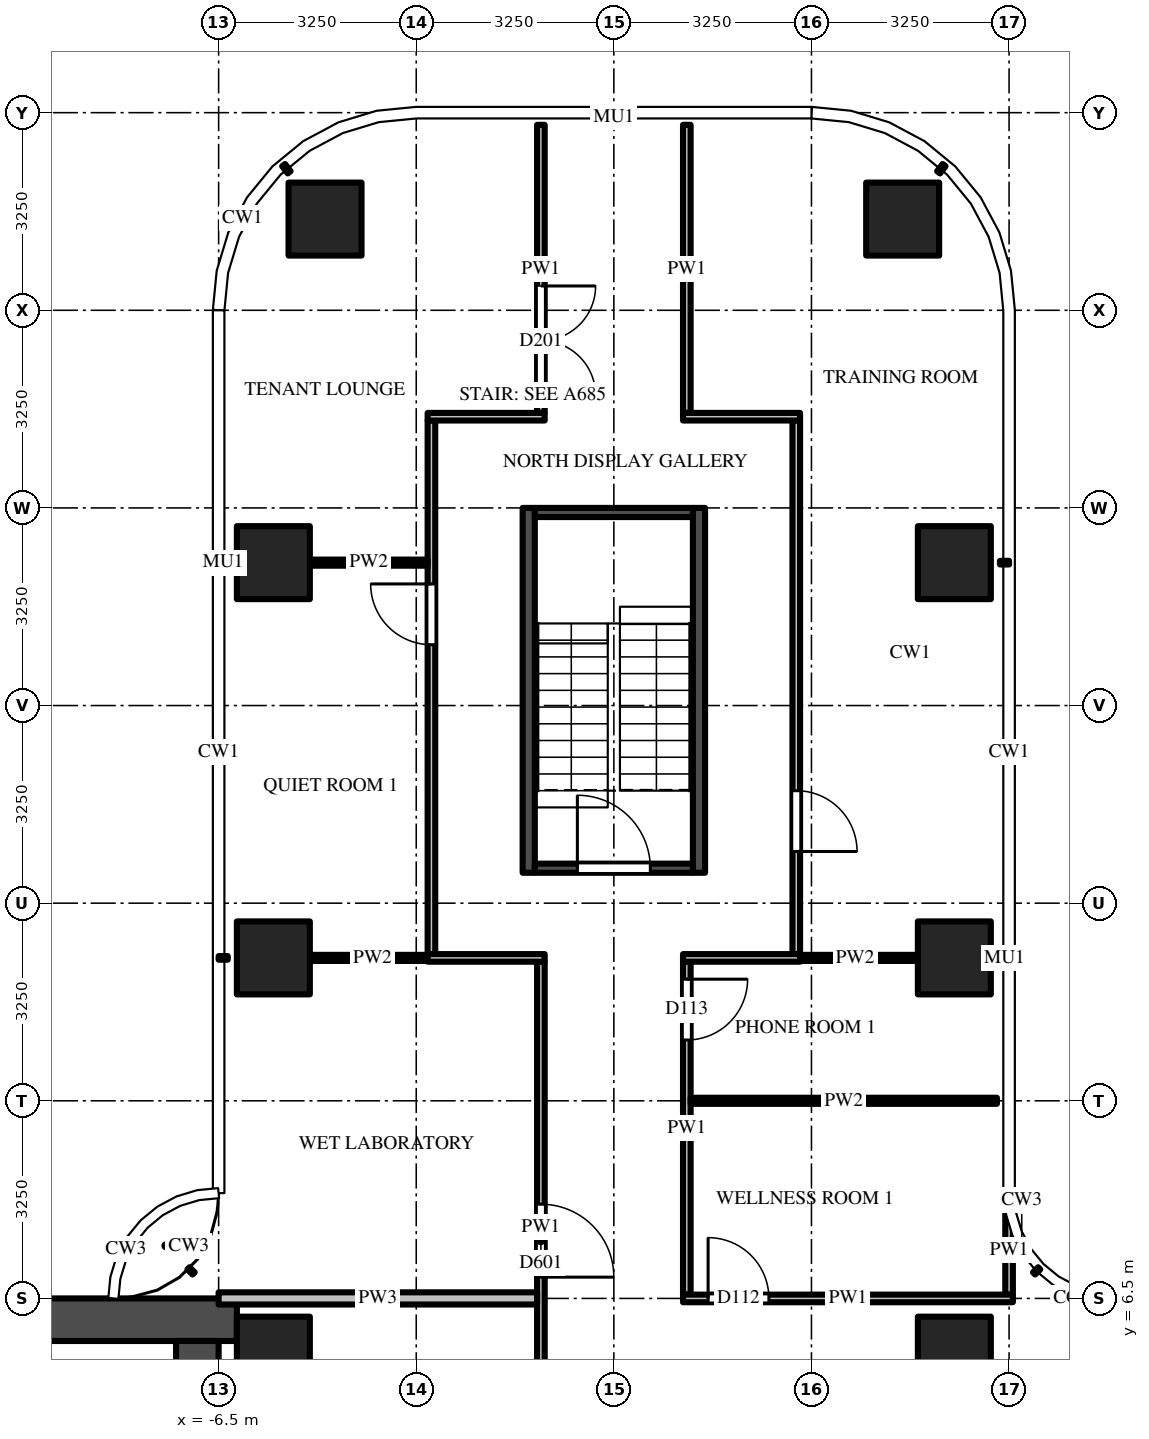
"""IFC4 building model, lengths in metres.
Left out: names, types, materials, properties, quantities, classifications, styles, units other than length and angle.
Written with IfcOpenShell. Run it as: python <this file> out.ifc"""

import sys

from ifc_helpers import new_model, si_unit, direction, frame, frame_2d, origin, origin_2d, place, context, subcontext, project, spatial, rectangle, extrude, source, transform, mapped, element, fill, save


model = new_model("IFC4")
c1 = context("Model", 3, precision=1e-05, world=origin(), true_north=direction((0.0, 1.0)))
c2 = subcontext(c1, "Body", "Model", "MODEL_VIEW")
j1 = project(units=[si_unit("LENGTHUNIT", "METRE"), si_unit("PLANEANGLEUNIT", "RADIAN")], contexts=[c1])
p1 = place(None, origin())
s1 = spatial("IfcSite", under=j1, at=p1, CompositionType="ELEMENT")
p2 = place(p1, origin())
s2 = spatial("IfcBuilding", under=s1, at=p2, CompositionType="ELEMENT")
p3 = place(p2, frame((0.0, 0.0, 181.5)))
s3 = spatial("IfcBuildingStorey", under=s2, at=p3, CompositionType="ELEMENT", Elevation=181.5)
m1 = source(origin(), c2, "Body", "SweptSolid", [
    extrude(rectangle(XDim=1.2, YDim=1.2, at=origin_2d()), origin(), (0.0, 0.0, 1.0), 3.9),
])
for number, where, z_axis, x_axis in (
    (1, (-5.6, 12.1, 0.0), (0.0, 0.0, 1.0), (1.0, 0.0, 0.0)),
    (2, (-5.6, 18.6, 0.0), (0.0, 0.0, 1.0), (1.0, 0.0, 0.0)),
    (3, (-4.75, 24.25, 0.0), (0.0, 0.0, 1.0), (1.0, 0.0, 0.0)),
    (4, (5.6, 12.1, 0.0), (0.0, 0.0, 1.0), (1.0, 0.0, 0.0)),
    (5, (5.6, 18.6, 0.0), (0.0, 0.0, 1.0), (1.0, 0.0, 0.0)),
    (6, (4.75, 24.25, 0.0), (0.0, 0.0, 1.0), (1.0, 0.0, 0.0)),
    (7, (5.6, 5.6, 0.0), (0.0, 0.0, 1.0), (1.0, 0.0, 0.0)),
    (8, (-5.6, 5.6, 0.0), (0.0, 0.0, 1.0), (1.0, 0.0, 0.0)),
):
    element("IfcColumn", number, at=place(p3, frame(where, z_axis=z_axis, x_axis=x_axis)), inside=s3, PredefinedType="COLUMN", context=c2, shape_type="MappedRepresentation", body=[
        mapped(m1, transform((0.0, 0.0, 0.0))),
    ])
m2 = source(origin(), c2, "Body", "SweptSolid", [
    extrude(rectangle(XDim=16.55, YDim=0.7, at=frame_2d((8.275, 0.0))), origin(), (0.0, 0.0, 1.0), 3.7),
])
p4 = place(p3, frame((-6.2, 6.15, 0.0), z_axis=(0.0, 0.0, 1.0), x_axis=(-1.0, 0.0, 0.0)))
e9 = element("IfcWall", 9, at=p4, inside=s3, PredefinedType="SHEAR", context=c2, shape_type="MappedRepresentation", body=[
    mapped(m2, transform((0.0, 0.0, 0.0))),
])
m3 = source(origin(), c2, "Body", "SweptSolid", [
    extrude(rectangle(XDim=9.05, YDim=0.7, at=frame_2d((4.525, 0.0))), origin(), (0.0, 0.0, 1.0), 3.7),
])
p5 = place(p3, frame((-6.85, 5.8, 0.0), z_axis=(0.0, 0.0, 1.0), x_axis=(0.0, -1.0, 0.0)))
e10 = element("IfcWall", 10, at=p5, inside=s3, PredefinedType="SHEAR", context=c2, shape_type="MappedRepresentation", body=[
    mapped(m3, transform((0.0, 0.0, 0.0))),
])
m4 = source(origin(), c2, "Body", "SweptSolid", [
    extrude(rectangle(XDim=1.8, YDim=2.1, at=frame_2d((0.9, 1.05))), frame((0.0, 0.36, 0.0), z_axis=(0.0, -1.0, 0.0), x_axis=(1.0, 0.0, 0.0)), (0.0, 0.0, 1.0), 0.72),
])
p6 = place(p5, frame((3.15, 0.0, 0.0)))
e11 = element("IfcOpeningElement", 11, at=p6, cuts=e10, PredefinedType="OPENING", context=c2, shape_type="MappedRepresentation", body=[
    mapped(m4, transform((0.0, 0.0, 0.0))),
])
m5 = source(origin(), c2, "Body", "SweptSolid", [
    extrude(rectangle(XDim=6.0, YDim=0.2, at=frame_2d((3.0, 0.0))), origin(), (0.0, 0.0, 1.0), 3.7),
])
for number, where, z_axis, x_axis in (
    (12, (-1.4, 13.5, 0.0), (0.0, 0.0, 1.0), (0.0, 1.0, 0.0)),
    (13, (1.4, 13.5, 0.0), (0.0, 0.0, 1.0), (0.0, 1.0, 0.0)),
):
    element("IfcWall", number, at=place(p3, frame(where, z_axis=z_axis, x_axis=x_axis)), inside=s3, PredefinedType="SHEAR", context=c2, shape_type="MappedRepresentation", body=[
        mapped(m5, transform((0.0, 0.0, 0.0))),
    ])
m6 = source(origin(), c2, "Body", "SweptSolid", [
    extrude(rectangle(XDim=2.6, YDim=0.15, at=frame_2d((1.3, 0.0))), origin(), (0.0, 0.0, 1.0), 3.7),
])
p7 = place(p3, frame((-1.3, 13.575, 0.0), z_axis=(0.0, 0.0, 1.0), x_axis=(1.0, 0.0, 0.0)))
e14 = element("IfcWall", 14, at=p7, inside=s3, PredefinedType="SHEAR", context=c2, shape_type="MappedRepresentation", body=[
    mapped(m6, transform((0.0, 0.0, 0.0))),
])
m7 = source(origin(), c2, "Body", "SweptSolid", [
    extrude(rectangle(XDim=1.2, YDim=2.1, at=frame_2d((0.6, 1.05))), frame((0.0, 0.085, 0.0), z_axis=(0.0, -1.0, 0.0), x_axis=(1.0, 0.0, 0.0)), (0.0, 0.0, 1.0), 0.17),
])
p8 = place(p7, frame((0.7, 0.0, 0.0)))
e15 = element("IfcOpeningElement", 15, at=p8, cuts=e14, PredefinedType="OPENING", context=c2, shape_type="MappedRepresentation", body=[
    mapped(m7, transform((0.0, 0.0, 0.0))),
])
p9 = place(p3, frame((-1.3, 19.425, 0.0), z_axis=(0.0, 0.0, 1.0), x_axis=(1.0, 0.0, 0.0)))
e16 = element("IfcWall", 16, at=p9, inside=s3, PredefinedType="SHEAR", context=c2, shape_type="MappedRepresentation", body=[
    mapped(m6, transform((0.0, 0.0, 0.0))),
])
m8 = source(origin(), c2, "Body", "SweptSolid", [
    extrude(rectangle(XDim=8.788, YDim=0.125, at=frame_2d((4.394, 0.0))), origin(), (0.0, 0.0, 1.0), 2.997),
])
p10 = place(p3, frame((-3.0, 12.15, 0.0), z_axis=(0.0, 0.0, 1.0), x_axis=(0.0, 1.0, 0.0)))
e17 = element("IfcWall", 17, at=p10, inside=s3, PredefinedType="PARTITIONING", context=c2, shape_type="MappedRepresentation", body=[
    mapped(m8, transform((0.0, 0.0, 0.0))),
])
m9 = source(origin(), c2, "Body", "SweptSolid", [
    extrude(rectangle(XDim=1.0, YDim=2.1, at=frame_2d((0.5, 1.05))), frame((0.0, 0.073, 0.0), z_axis=(0.0, -1.0, 0.0), x_axis=(1.0, 0.0, 0.0)), (0.0, 0.0, 1.0), 0.145),
])
p11 = place(p10, frame((5.1, 0.0, 0.0)))
e18 = element("IfcOpeningElement", 18, at=p11, cuts=e17, PredefinedType="OPENING", context=c2, shape_type="MappedRepresentation", body=[
    mapped(m9, transform((0.0, 0.0, 0.0))),
])
m10 = source(origin(), c2, "Body", "SweptSolid", [
    extrude(rectangle(XDim=8.725, YDim=0.125, at=frame_2d((4.363, 0.0))), origin(), (0.0, 0.0, 1.0), 2.997),
])
p12 = place(p3, frame((-1.2, 12.038, 0.0), z_axis=(0.0, 0.0, 1.0), x_axis=(0.0, -1.0, 0.0)))
e19 = element("IfcWall", 19, at=p12, inside=s3, PredefinedType="PARTITIONING", context=c2, shape_type="MappedRepresentation", body=[
    mapped(m10, transform((0.0, 0.0, 0.0))),
])
m11 = source(origin(), c2, "Body", "SweptSolid", [
    extrude(rectangle(XDim=1.2, YDim=2.1, at=frame_2d((0.6, 1.05))), frame((0.0, 0.073, 0.0), z_axis=(0.0, -1.0, 0.0), x_axis=(1.0, 0.0, 0.0)), (0.0, 0.0, 1.0), 0.145),
])
p13 = place(p12, frame((3.988, 0.0, 0.0)))
e20 = element("IfcOpeningElement", 20, at=p13, cuts=e19, PredefinedType="OPENING", context=c2, shape_type="MappedRepresentation", body=[
    mapped(m11, transform((0.0, 0.0, 0.0))),
])
m12 = source(origin(), c2, "Body", "SweptSolid", [
    extrude(rectangle(XDim=4.738, YDim=0.125, at=frame_2d((2.369, 0.0))), origin(), (0.0, 0.0, 1.0), 2.78),
])
p14 = place(p3, frame((-1.2, 25.8, 0.0), z_axis=(0.0, 0.0, 1.0), x_axis=(0.0, -1.0, 0.0)))
e21 = element("IfcWall", 21, at=p14, inside=s3, PredefinedType="PARTITIONING", context=c2, shape_type="MappedRepresentation", body=[
    mapped(m12, transform((0.0, 0.0, 0.0))),
])
m13 = source(origin(), c2, "Body", "SweptSolid", [
    extrude(rectangle(XDim=1.8, YDim=2.1, at=frame_2d((0.9, 1.05))), frame((0.0, 0.073, 0.0), z_axis=(0.0, -1.0, 0.0), x_axis=(1.0, 0.0, 0.0)), (0.0, 0.0, 1.0), 0.145),
])
p15 = place(p14, frame((2.65, 0.0, 0.0)))
e22 = element("IfcOpeningElement", 22, at=p15, cuts=e21, PredefinedType="OPENING", context=c2, shape_type="MappedRepresentation", body=[
    mapped(m13, transform((0.0, 0.0, 0.0))),
])
m14 = source(origin(), c2, "Body", "SweptSolid", [
    extrude(rectangle(XDim=5.475, YDim=0.125, at=frame_2d((2.738, 0.0))), origin(), (0.0, 0.0, 1.0), 2.997),
])
p16 = place(p3, frame((1.2, 12.038, 0.0), z_axis=(0.0, 0.0, 1.0), x_axis=(0.0, -1.0, 0.0)))
e23 = element("IfcWall", 23, at=p16, inside=s3, PredefinedType="PARTITIONING", context=c2, shape_type="MappedRepresentation", body=[
    mapped(m14, transform((0.0, 0.0, 0.0))),
])
p17 = place(p16, frame((0.288, 0.0, 0.0)))
e24 = element("IfcOpeningElement", 24, at=p17, cuts=e23, PredefinedType="OPENING", context=c2, shape_type="MappedRepresentation", body=[
    mapped(m9, transform((0.0, 0.0, 0.0))),
])
p18 = place(p3, frame((1.2, 25.8, 0.0), z_axis=(0.0, 0.0, 1.0), x_axis=(0.0, -1.0, 0.0)))
e25 = element("IfcWall", 25, at=p18, inside=s3, PredefinedType="PARTITIONING", context=c2, shape_type="MappedRepresentation", body=[
    mapped(m12, transform((0.0, 0.0, 0.0))),
])
p19 = place(p3, frame((3.0, 20.938, 0.0), z_axis=(0.0, 0.0, 1.0), x_axis=(0.0, -1.0, 0.0)))
e26 = element("IfcWall", 26, at=p19, inside=s3, PredefinedType="PARTITIONING", context=c2, shape_type="MappedRepresentation", body=[
    mapped(m8, transform((0.0, 0.0, 0.0))),
])
p20 = place(p19, frame((6.087, 0.0, 0.0)))
e27 = element("IfcOpeningElement", 27, at=p20, cuts=e26, PredefinedType="OPENING", context=c2, shape_type="MappedRepresentation", body=[
    mapped(m9, transform((0.0, 0.0, 0.0))),
])
m15 = source(origin(), c2, "Body", "SweptSolid", [
    extrude(rectangle(XDim=1.469, YDim=0.125, at=frame_2d((0.734, 0.0))), origin(), (0.0, 0.0, 1.0), 3.7),
])
p21 = place(p3, frame((6.5, 6.562, 0.0), z_axis=(0.0, 0.0, 1.0), x_axis=(0.0, 1.0, 0.0)))
e28 = element("IfcWall", 28, at=p21, inside=s3, PredefinedType="PARTITIONING", context=c2, shape_type="MappedRepresentation", body=[
    mapped(m15, transform((0.0, 0.0, 0.0))),
])
m16 = source(origin(), c2, "Body", "SweptSolid", [
    extrude(rectangle(XDim=5.238, YDim=0.2, at=frame_2d((2.619, 0.0))), origin(), (0.0, 0.0, 1.0), 2.78),
])
p22 = place(p3, frame((-6.5, 6.5, 0.0), z_axis=(0.0, 0.0, 1.0), x_axis=(1.0, 0.0, 0.0)))
e29 = element("IfcWall", 29, at=p22, inside=s3, PredefinedType="PARTITIONING", context=c2, shape_type="MappedRepresentation", body=[
    mapped(m16, transform((0.0, 0.0, 0.0))),
])
m17 = source(origin(), c2, "Body", "SweptSolid", [
    extrude(rectangle(XDim=5.425, YDim=0.125, at=frame_2d((2.712, 0.0))), origin(), (0.0, 0.0, 1.0), 2.78),
])
p23 = place(p3, frame((1.137, 6.5, 0.0), z_axis=(0.0, 0.0, 1.0), x_axis=(1.0, 0.0, 0.0)))
e30 = element("IfcWall", 30, at=p23, inside=s3, PredefinedType="PARTITIONING", context=c2, shape_type="MappedRepresentation", body=[
    mapped(m17, transform((0.0, 0.0, 0.0))),
])
p24 = place(p23, frame((0.413, 0.0, 0.0)))
e31 = element("IfcOpeningElement", 31, at=p24, cuts=e30, PredefinedType="OPENING", context=c2, shape_type="MappedRepresentation", body=[
    mapped(m9, transform((0.0, 0.0, 0.0))),
])
m18 = source(origin(), c2, "Body", "SweptSolid", [
    extrude(rectangle(XDim=5.038, YDim=0.1, at=frame_2d((2.519, 0.0))), origin(), (0.0, 0.0, 1.0), 2.78),
])
p25 = place(p3, frame((1.262, 9.75, 0.0), z_axis=(0.0, 0.0, 1.0), x_axis=(1.0, 0.0, 0.0)))
e32 = element("IfcWall", 32, at=p25, inside=s3, PredefinedType="PARTITIONING", context=c2, shape_type="MappedRepresentation", body=[
    mapped(m18, transform((0.0, 0.0, 0.0))),
])
m19 = source(origin(), c2, "Body", "SweptSolid", [
    extrude(rectangle(XDim=2.062, YDim=0.1, at=frame_2d((1.031, 0.0))), origin(), (0.0, 0.0, 1.0), 2.997),
])
for number, where, z_axis, x_axis in (
    (33, (-5.0, 12.1, 0.0), (0.0, 0.0, 1.0), (1.0, 0.0, 0.0)),
    (34, (2.938, 12.1, 0.0), (0.0, 0.0, 1.0), (1.0, 0.0, 0.0)),
):
    element("IfcWall", number, at=place(p3, frame(where, z_axis=z_axis, x_axis=x_axis)), inside=s3, PredefinedType="PARTITIONING", context=c2, shape_type="MappedRepresentation", body=[
        mapped(m19, transform((0.0, 0.0, 0.0))),
    ])
m20 = source(origin(), c2, "Body", "SweptSolid", [
    extrude(rectangle(XDim=1.925, YDim=0.125, at=frame_2d((0.962, 0.0))), origin(), (0.0, 0.0, 1.0), 2.997),
])
for number, where, z_axis, x_axis in (
    (35, (-1.137, 12.1, 0.0), (0.0, 0.0, 1.0), (-1.0, 0.0, 0.0)),
    (36, (3.062, 12.1, 0.0), (0.0, 0.0, 1.0), (-1.0, 0.0, 0.0)),
):
    element("IfcWall", number, at=place(p3, frame(where, z_axis=z_axis, x_axis=x_axis)), inside=s3, PredefinedType="PARTITIONING", context=c2, shape_type="MappedRepresentation", body=[
        mapped(m20, transform((0.0, 0.0, 0.0))),
    ])
m21 = source(origin(), c2, "Body", "SweptSolid", [
    extrude(rectangle(XDim=1.938, YDim=0.1, at=frame_2d((0.969, 0.0))), origin(), (0.0, 0.0, 1.0), 3.223),
])
p26 = place(p3, frame((-5.0, 18.6, 0.0), z_axis=(0.0, 0.0, 1.0), x_axis=(1.0, 0.0, 0.0)))
e37 = element("IfcWall", 37, at=p26, inside=s3, PredefinedType="PARTITIONING", context=c2, shape_type="MappedRepresentation", body=[
    mapped(m21, transform((0.0, 0.0, 0.0))),
])
m22 = source(origin(), c2, "Body", "SweptSolid", [
    extrude(rectangle(XDim=1.925, YDim=0.125, at=frame_2d((0.962, 0.0))), origin(), (0.0, 0.0, 1.0), 3.7),
])
for number, where, z_axis, x_axis in (
    (38, (-3.062, 21.0, 0.0), (0.0, 0.0, 1.0), (1.0, 0.0, 0.0)),
    (39, (1.137, 21.0, 0.0), (0.0, 0.0, 1.0), (1.0, 0.0, 0.0)),
):
    element("IfcWall", number, at=place(p3, frame(where, z_axis=z_axis, x_axis=x_axis)), inside=s3, PredefinedType="PARTITIONING", context=c2, shape_type="MappedRepresentation", body=[
        mapped(m22, transform((0.0, 0.0, 0.0))),
    ])
m23 = source(origin(), c2, "Body", "SweptSolid", [
    extrude(rectangle(XDim=1.2, YDim=2.1, at=frame_2d((0.6, 1.05))), frame((0.0, 0.025, 0.0), z_axis=(0.0, -1.0, 0.0), x_axis=(1.0, 0.0, 0.0)), (0.0, 0.0, 1.0), 0.05),
])
p27 = place(p8, origin())
e40 = element("IfcDoor", 40, at=p27, inside=s3, OperationType="SINGLE_SWING_LEFT", PredefinedType="DOOR", context=c2, shape_type="MappedRepresentation", body=[
    mapped(m23, transform((0.0, 0.0, 0.0))),
])
fill(e15, e40)
m24 = source(origin(), c2, "Body", "SweptSolid", [
    extrude(rectangle(XDim=1.0, YDim=2.1, at=frame_2d((0.5, 1.05))), frame((0.0, 0.025, 0.0), z_axis=(0.0, -1.0, 0.0), x_axis=(1.0, 0.0, 0.0)), (0.0, 0.0, 1.0), 0.05),
])
p28 = place(p24, origin())
e41 = element("IfcDoor", 41, at=p28, inside=s3, OperationType="SINGLE_SWING_LEFT", PredefinedType="DOOR", context=c2, shape_type="MappedRepresentation", body=[
    mapped(m24, transform((0.0, 0.0, 0.0))),
])
fill(e31, e41)
p29 = place(p13, origin())
e42 = element("IfcDoor", 42, at=p29, inside=s3, OperationType="SINGLE_SWING_RIGHT", PredefinedType="DOOR", context=c2, shape_type="MappedRepresentation", body=[
    mapped(m23, transform((0.0, 0.0, 0.0))),
])
fill(e20, e42)
p30 = place(p17, origin())
e43 = element("IfcDoor", 43, at=p30, inside=s3, OperationType="SINGLE_SWING_LEFT", PredefinedType="DOOR", context=c2, shape_type="MappedRepresentation", body=[
    mapped(m24, transform((0.0, 0.0, 0.0))),
])
fill(e24, e43)
p31 = place(p20, origin())
e44 = element("IfcDoor", 44, at=p31, inside=s3, OperationType="SINGLE_SWING_RIGHT", PredefinedType="DOOR", context=c2, shape_type="MappedRepresentation", body=[
    mapped(m24, transform((0.0, 0.0, 0.0))),
])
fill(e27, e44)
p32 = place(p11, origin())
e45 = element("IfcDoor", 45, at=p32, inside=s3, OperationType="SINGLE_SWING_RIGHT", PredefinedType="DOOR", context=c2, shape_type="MappedRepresentation", body=[
    mapped(m24, transform((0.0, 0.0, 0.0))),
])
fill(e18, e45)
m25 = source(origin(), c2, "Body", "SweptSolid", [
    extrude(rectangle(XDim=1.8, YDim=2.1, at=frame_2d((0.9, 1.05))), frame((0.0, 0.025, 0.0), z_axis=(0.0, -1.0, 0.0), x_axis=(1.0, 0.0, 0.0)), (0.0, 0.0, 1.0), 0.05),
])
p33 = place(p15, origin())
e46 = element("IfcDoor", 46, at=p33, inside=s3, OperationType="DOUBLE_DOOR_SINGLE_SWING", PredefinedType="DOOR", context=c2, shape_type="MappedRepresentation", body=[
    mapped(m25, transform((0.0, 0.0, 0.0))),
])
fill(e22, e46)
save(model, sys.argv[1])
